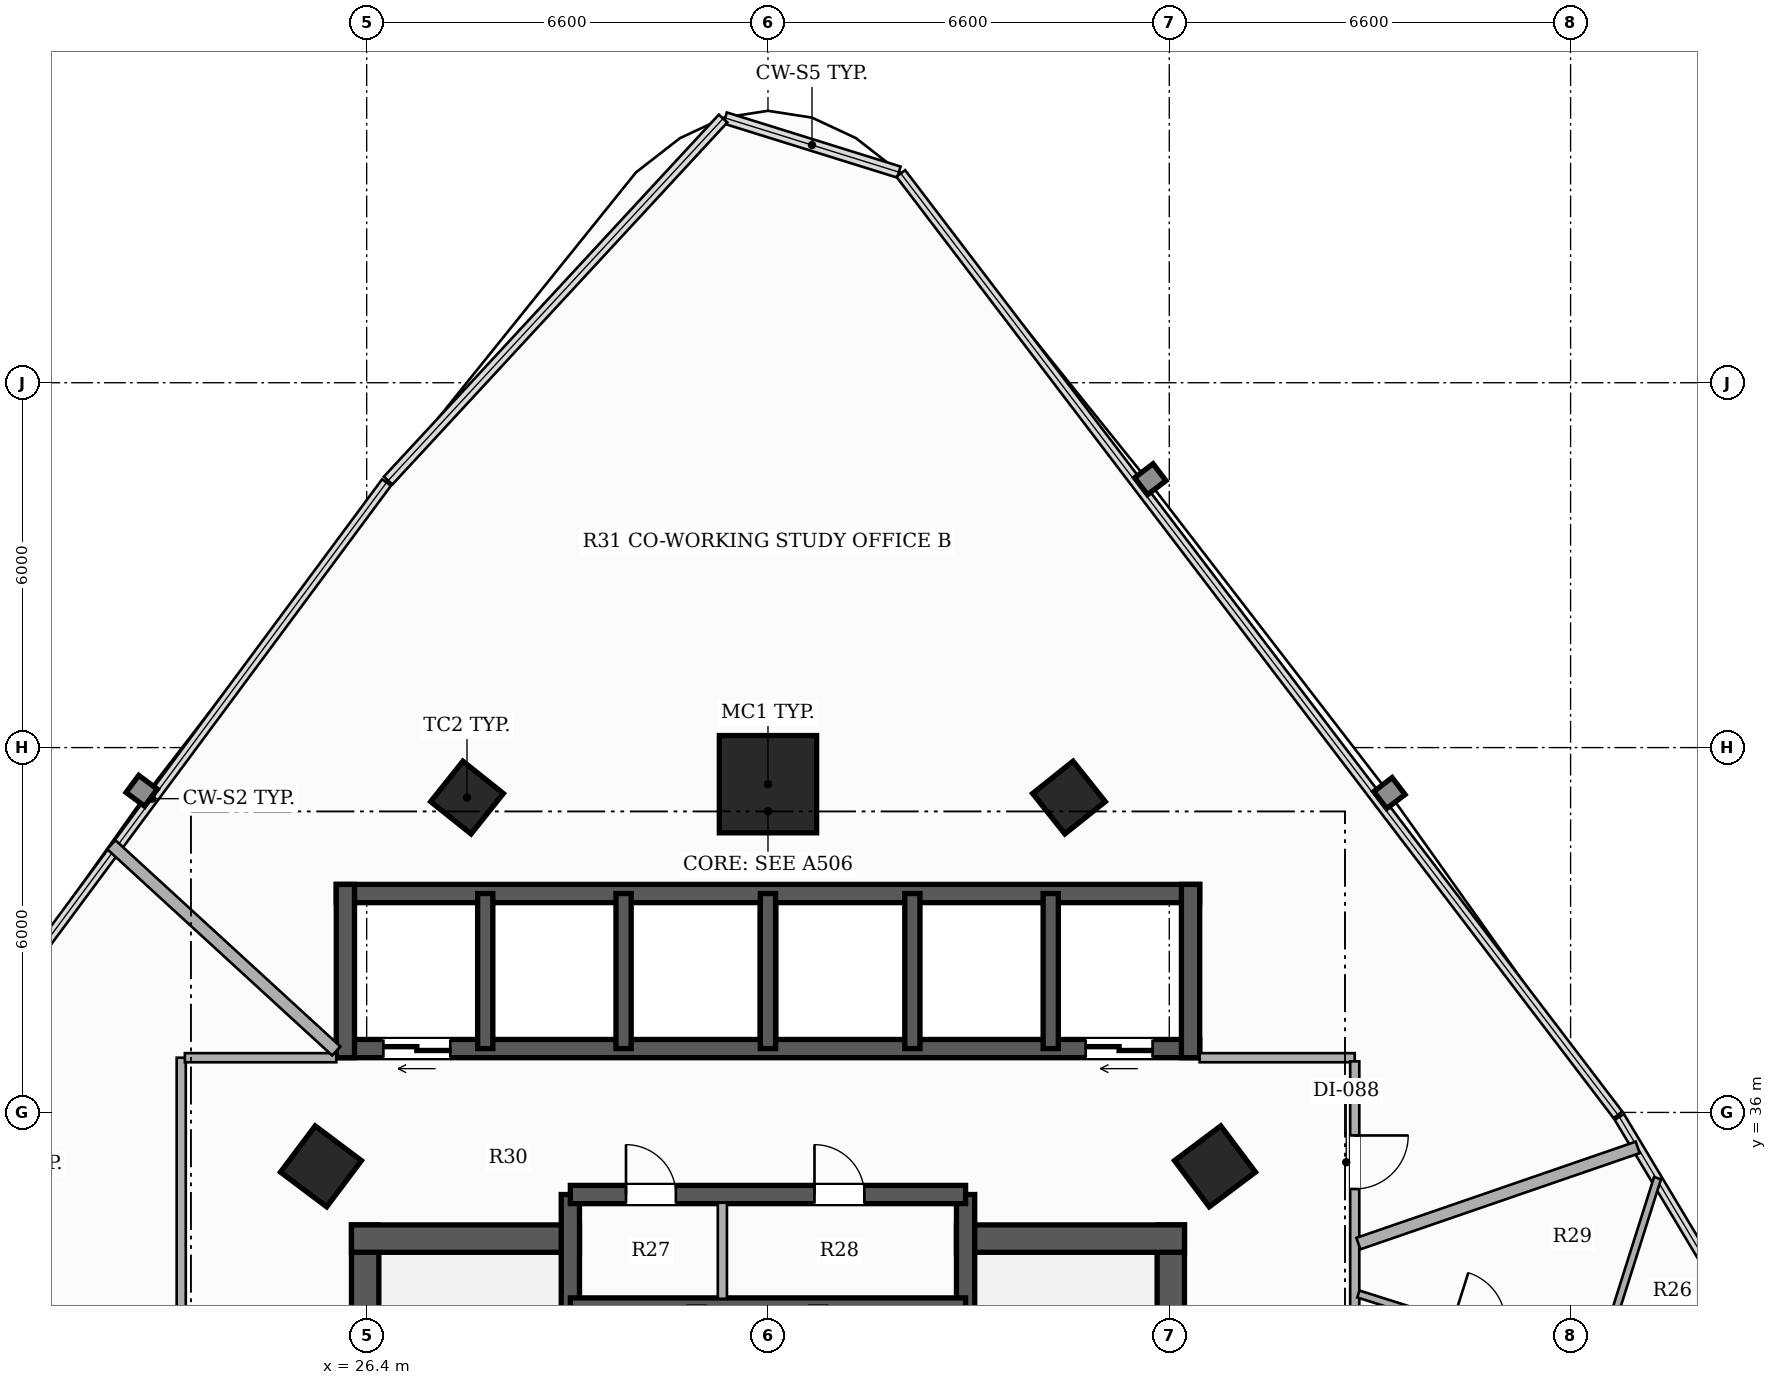
"""IFC4 building model, lengths in metres.
Left out: names, types, materials, properties, quantities, classifications, styles, units other than length and angle.
Written with IfcOpenShell. Run it as: python <this file> out.ifc"""

import sys

from ifc_helpers import new_model, si_unit, direction, frame, frame_2d, origin, origin_2d, place, context, subcontext, project, spatial, rectangle, hollow_rectangle, extrude, element, fill, save


model = new_model("IFC4")
c1 = context("Model", 3, precision=1e-05, world=origin(), true_north=direction((0.0, 1.0)))
c2 = subcontext(c1, "Body", "Model", "MODEL_VIEW")
j1 = project(units=[si_unit("LENGTHUNIT", "METRE"), si_unit("PLANEANGLEUNIT", "RADIAN")], contexts=[c1])
p1 = place(None, origin())
s1 = spatial("IfcSite", under=j1, at=p1, CompositionType="ELEMENT")
p2 = place(p1, origin())
s2 = spatial("IfcBuilding", under=s1, at=p2, CompositionType="ELEMENT")
p3 = place(p2, frame((0.0, 0.0, 33.5)))
s3 = spatial("IfcBuildingStorey", under=s2, at=p3, CompositionType="ELEMENT", Elevation=33.5)
p4 = place(p3, frame((26.375, 26.45, 0.0), z_axis=(0.0, 0.0, 1.0), x_axis=(0.0, 1.0, 0.0)))
e1 = element("IfcWall", 1, at=p4, inside=s3, PredefinedType="SHEAR", context=c2, shape_type="SweptSolid", body=[
    extrude(rectangle(XDim=7.7, YDim=0.45, at=frame_2d((3.85, 0.0))), origin(), (0.0, 0.0, 1.0), 3.3),
])
p5 = place(p3, frame((26.15, 33.925, 0.0), z_axis=(0.0, 0.0, 1.0), x_axis=(1.0, 0.0, 0.0)))
e2 = element("IfcWall", 2, at=p5, inside=s3, PredefinedType="SHEAR", context=c2, shape_type="SweptSolid", body=[
    extrude(rectangle(XDim=3.75, YDim=0.45, at=frame_2d((1.875, 0.0))), origin(), (0.0, 0.0, 1.0), 3.3),
])
p6 = place(p3, frame((39.625, 26.45, 0.0), z_axis=(0.0, 0.0, 1.0), x_axis=(0.0, 1.0, 0.0)))
e3 = element("IfcWall", 3, at=p6, inside=s3, PredefinedType="SHEAR", context=c2, shape_type="SweptSolid", body=[
    extrude(rectangle(XDim=7.7, YDim=0.45, at=frame_2d((3.85, 0.0))), origin(), (0.0, 0.0, 1.0), 3.3),
])
p7 = place(p3, frame((36.1, 33.925, 0.0), z_axis=(0.0, 0.0, 1.0), x_axis=(1.0, 0.0, 0.0)))
e4 = element("IfcWall", 4, at=p7, inside=s3, PredefinedType="SHEAR", context=c2, shape_type="SweptSolid", body=[
    extrude(rectangle(XDim=3.75, YDim=0.45, at=frame_2d((1.875, 0.0))), origin(), (0.0, 0.0, 1.0), 3.3),
])
p8 = place(p3, frame((29.75, 26.45, 0.0), z_axis=(0.0, 0.0, 1.0), x_axis=(0.0, 1.0, 0.0)))
e5 = element("IfcWall", 5, at=p8, inside=s3, PredefinedType="SHEAR", context=c2, shape_type="SweptSolid", body=[
    extrude(rectangle(XDim=8.2, YDim=0.3, at=frame_2d((4.1, 0.0))), origin(), (0.0, 0.0, 1.0), 3.3),
])
p9 = place(p8, frame((0.6, 0.0, 0.0)))
e6 = element("IfcOpeningElement", 6, at=p9, cuts=e5, PredefinedType="OPENING", context=c2, shape_type="SweptSolid", body=[
    extrude(rectangle(XDim=1.05, YDim=2.15, at=frame_2d((0.525, 1.075))), frame((0.0, 0.16, 0.0), z_axis=(0.0, -1.0, 0.0), x_axis=(1.0, 0.0, 0.0)), (0.0, 0.0, 1.0), 0.32),
])
p10 = place(p3, frame((36.25, 26.45, 0.0), z_axis=(0.0, 0.0, 1.0), x_axis=(0.0, 1.0, 0.0)))
e7 = element("IfcWall", 7, at=p10, inside=s3, PredefinedType="SHEAR", context=c2, shape_type="SweptSolid", body=[
    extrude(rectangle(XDim=8.2, YDim=0.3, at=frame_2d((4.1, 0.0))), origin(), (0.0, 0.0, 1.0), 3.3),
])
p11 = place(p10, frame((0.6, 0.0, 0.0)))
e8 = element("IfcOpeningElement", 8, at=p11, cuts=e7, PredefinedType="OPENING", context=c2, shape_type="SweptSolid", body=[
    extrude(rectangle(XDim=1.05, YDim=2.15, at=frame_2d((0.525, 1.075))), frame((0.0, 0.16, 0.0), z_axis=(0.0, -1.0, 0.0), x_axis=(1.0, 0.0, 0.0)), (0.0, 0.0, 1.0), 0.32),
])
p12 = place(p3, frame((29.75, 32.8, 0.0), z_axis=(0.0, 0.0, 1.0), x_axis=(1.0, 0.0, 0.0)))
e9 = element("IfcWall", 9, at=p12, inside=s3, PredefinedType="SHEAR", context=c2, shape_type="SweptSolid", body=[
    extrude(rectangle(XDim=6.5, YDim=0.3, at=frame_2d((3.25, 0.0))), origin(), (0.0, 0.0, 1.0), 3.3),
])
p13 = place(p3, frame((29.75, 34.65, 0.0), z_axis=(0.0, 0.0, 1.0), x_axis=(1.0, 0.0, 0.0)))
e10 = element("IfcWall", 10, at=p13, inside=s3, PredefinedType="SHEAR", context=c2, shape_type="SweptSolid", body=[
    extrude(rectangle(XDim=6.5, YDim=0.3, at=frame_2d((3.25, 0.0))), origin(), (0.0, 0.0, 1.0), 3.3),
])
p14 = place(p13, frame((0.915, 0.0, 0.0)))
e11 = element("IfcOpeningElement", 11, at=p14, cuts=e10, PredefinedType="OPENING", context=c2, shape_type="SweptSolid", body=[
    extrude(rectangle(XDim=0.82, YDim=2.1, at=frame_2d((0.41, 1.05))), frame((0.0, 0.16, 0.0), z_axis=(0.0, -1.0, 0.0), x_axis=(1.0, 0.0, 0.0)), (0.0, 0.0, 1.0), 0.32),
])
p15 = place(p13, frame((4.015, 0.0, 0.0)))
e12 = element("IfcOpeningElement", 12, at=p15, cuts=e10, PredefinedType="OPENING", context=c2, shape_type="SweptSolid", body=[
    extrude(rectangle(XDim=0.82, YDim=2.1, at=frame_2d((0.41, 1.05))), frame((0.0, 0.16, 0.0), z_axis=(0.0, -1.0, 0.0), x_axis=(1.0, 0.0, 0.0)), (0.0, 0.0, 1.0), 0.32),
])
p16 = place(p3, frame((40.1, 37.05, 0.0), z_axis=(0.0, 0.0, 1.0), x_axis=(-1.0, 0.0, 0.0)))
e13 = element("IfcWall", 13, at=p16, inside=s3, PredefinedType="SHEAR", context=c2, shape_type="SweptSolid", body=[
    extrude(rectangle(XDim=14.2, YDim=0.3, at=frame_2d((7.1, 0.0))), origin(), (0.0, 0.0, 1.0), 3.3),
])
p17 = place(p16, frame((12.325, 0.0, 0.0)))
e14 = element("IfcOpeningElement", 14, at=p17, cuts=e13, PredefinedType="OPENING", context=c2, shape_type="SweptSolid", body=[
    extrude(rectangle(XDim=1.1, YDim=2.2, at=frame_2d((0.55, 1.1))), frame((0.0, 0.16, 0.0), z_axis=(0.0, -1.0, 0.0), x_axis=(1.0, 0.0, 0.0)), (0.0, 0.0, 1.0), 0.32),
])
p18 = place(p16, frame((0.775, 0.0, 0.0)))
e15 = element("IfcOpeningElement", 15, at=p18, cuts=e13, PredefinedType="OPENING", context=c2, shape_type="SweptSolid", body=[
    extrude(rectangle(XDim=1.1, YDim=2.2, at=frame_2d((0.55, 1.1))), frame((0.0, 0.16, 0.0), z_axis=(0.0, -1.0, 0.0), x_axis=(1.0, 0.0, 0.0)), (0.0, 0.0, 1.0), 0.32),
])
p19 = place(p3, frame((25.9, 39.6, 0.0), z_axis=(0.0, 0.0, 1.0), x_axis=(1.0, 0.0, 0.0)))
e16 = element("IfcWall", 16, at=p19, inside=s3, PredefinedType="SHEAR", context=c2, shape_type="SweptSolid", body=[
    extrude(rectangle(XDim=14.2, YDim=0.3, at=frame_2d((7.1, 0.0))), origin(), (0.0, 0.0, 1.0), 3.3),
])
for number, where, z_axis, x_axis in (
    (17, (26.05, 36.9, 0.0), (0.0, 0.0, 1.0), (0.0, 1.0, 0.0)),
    (18, (39.95, 36.9, 0.0), (0.0, 0.0, 1.0), (0.0, 1.0, 0.0)),
):
    element("IfcWall", number, at=place(p3, frame(where, z_axis=z_axis, x_axis=x_axis)), inside=s3, PredefinedType="SHEAR", context=c2, shape_type="SweptSolid", body=[
        extrude(rectangle(XDim=2.85, YDim=0.3, at=frame_2d((1.425, 0.0))), origin(), (0.0, 0.0, 1.0), 3.3),
    ])
for number, where, z_axis, x_axis in (
    (19, (28.35, 37.05, 0.0), (0.0, 0.0, 1.0), (0.0, 1.0, 0.0)),
    (20, (30.625, 37.05, 0.0), (0.0, 0.0, 1.0), (0.0, 1.0, 0.0)),
    (21, (33.0, 37.05, 0.0), (0.0, 0.0, 1.0), (0.0, 1.0, 0.0)),
    (22, (35.375, 37.05, 0.0), (0.0, 0.0, 1.0), (0.0, 1.0, 0.0)),
    (23, (37.65, 37.05, 0.0), (0.0, 0.0, 1.0), (0.0, 1.0, 0.0)),
):
    element("IfcWall", number, at=place(p3, frame(where, z_axis=z_axis, x_axis=x_axis)), inside=s3, PredefinedType="SHEAR", context=c2, shape_type="SweptSolid", body=[
        extrude(rectangle(XDim=2.55, YDim=0.25, at=frame_2d((1.275, 0.0))), origin(), (0.0, 0.0, 1.0), 3.3),
    ])
p20 = place(p3, frame((33.0, 41.398, 0.0), z_axis=(0.0, 0.0, 1.0), x_axis=(1.0, 0.0, 0.0)))
e24 = element("IfcColumn", 24, at=p20, inside=s3, PredefinedType="COLUMN", context=c2, shape_type="SweptSolid", body=[
    extrude(hollow_rectangle(XDim=1.6, YDim=1.6, WallThickness=0.05, at=origin_2d()), origin(), (0.0, 0.0, 1.0), 3.3),
])
for number, where, z_axis, x_axis in (
    (25, (25.648, 35.113, 0.0), (0.0, 0.0, 1.0), (0.6, 0.8, 0.0)),
    (26, (40.352, 35.113, 0.0), (0.0, 0.0, 1.0), (-0.6, 0.8, 0.0)),
):
    element("IfcColumn", number, at=place(p3, frame(where, z_axis=z_axis, x_axis=x_axis)), inside=s3, PredefinedType="COLUMN", context=c2, shape_type="SweptSolid", body=[
        extrude(hollow_rectangle(XDim=0.95, YDim=0.95, WallThickness=0.032, at=origin_2d()), origin(), (0.0, 0.0, 1.0), 3.3),
    ])
for number, where, z_axis, x_axis in (
    (27, (28.05, 41.178, 0.0), (0.0, 0.0, 1.0), (0.624, 0.782, 0.0)),
    (28, (37.95, 41.178, 0.0), (0.0, 0.0, 1.0), (-0.624, 0.782, 0.0)),
):
    element("IfcColumn", number, at=place(p3, frame(where, z_axis=z_axis, x_axis=x_axis)), inside=s3, PredefinedType="COLUMN", context=c2, shape_type="SweptSolid", body=[
        extrude(hollow_rectangle(XDim=0.85, YDim=0.85, WallThickness=0.028, at=origin_2d()), origin(), (0.0, 0.0, 1.0), 3.3),
    ])
p21 = place(p3, frame((32.25, 32.935, 0.0), z_axis=(0.0, 0.0, 1.0), x_axis=(0.0, 1.0, 0.0)))
e29 = element("IfcWall", 29, at=p21, inside=s3, PredefinedType="PARTITIONING", context=c2, shape_type="SweptSolid", body=[
    extrude(rectangle(XDim=1.58, YDim=0.15, at=frame_2d((0.79, 0.0))), origin(), (0.0, 0.0, 1.0), 3.06),
])
p22 = place(p3, frame((40.1, 36.9, 0.0), z_axis=(0.0, 0.0, 1.0), x_axis=(1.0, 0.0, 0.0)))
e30 = element("IfcWall", 30, at=p22, inside=s3, PredefinedType="PARTITIONING", context=c2, shape_type="SweptSolid", body=[
    extrude(rectangle(XDim=2.55, YDim=0.15, at=frame_2d((1.275, 0.0))), origin(), (0.0, 0.0, 1.0), 2.413),
])
p23 = place(p3, frame((42.65, 36.84, 0.0), z_axis=(0.0, 0.0, 1.0), x_axis=(0.0, -1.0, 0.0)))
e31 = element("IfcWall", 31, at=p23, inside=s3, PredefinedType="PARTITIONING", context=c2, shape_type="SweptSolid", body=[
    extrude(rectangle(XDim=25.04, YDim=0.15, at=frame_2d((12.52, 0.0))), origin(), (0.0, 0.0, 1.0), 2.413),
])
p24 = place(p23, frame((1.219, 0.0, 0.0)))
e32 = element("IfcOpeningElement", 32, at=p24, cuts=e31, PredefinedType="OPENING", context=c2, shape_type="SweptSolid", body=[
    extrude(rectangle(XDim=0.88, YDim=2.1, at=frame_2d((0.44, 1.05))), frame((0.0, 0.085, 0.0), z_axis=(0.0, -1.0, 0.0), x_axis=(1.0, 0.0, 0.0)), (0.0, 0.0, 1.0), 0.17),
])
p25 = place(p23, frame((21.047, 0.0, 0.0)))
e33 = element("IfcOpeningElement", 33, at=p25, cuts=e31, PredefinedType="OPENING", context=c2, shape_type="SweptSolid", body=[
    extrude(rectangle(XDim=0.88, YDim=2.1, at=frame_2d((0.44, 1.05))), frame((0.0, 0.085, 0.0), z_axis=(0.0, -1.0, 0.0), x_axis=(1.0, 0.0, 0.0)), (0.0, 0.0, 1.0), 0.17),
])
p26 = place(p23, frame((16.029, 0.0, 0.0)))
e34 = element("IfcOpeningElement", 34, at=p26, cuts=e31, PredefinedType="OPENING", context=c2, shape_type="SweptSolid", body=[
    extrude(rectangle(XDim=0.92, YDim=2.15, at=frame_2d((0.46, 1.075))), frame((0.0, 0.085, 0.0), z_axis=(0.0, -1.0, 0.0), x_axis=(1.0, 0.0, 0.0)), (0.0, 0.0, 1.0), 0.17),
])
p27 = place(p23, frame((12.486, 0.0, 0.0)))
e35 = element("IfcOpeningElement", 35, at=p27, cuts=e31, PredefinedType="OPENING", context=c2, shape_type="SweptSolid", body=[
    extrude(rectangle(XDim=0.88, YDim=2.1, at=frame_2d((0.44, 1.05))), frame((0.0, 0.085, 0.0), z_axis=(0.0, -1.0, 0.0), x_axis=(1.0, 0.0, 0.0)), (0.0, 0.0, 1.0), 0.17),
])
p28 = place(p23, frame((6.638, 0.0, 0.0)))
e36 = element("IfcOpeningElement", 36, at=p28, cuts=e31, PredefinedType="OPENING", context=c2, shape_type="SweptSolid", body=[
    extrude(rectangle(XDim=0.92, YDim=2.15, at=frame_2d((0.46, 1.075))), frame((0.0, 0.085, 0.0), z_axis=(0.0, -1.0, 0.0), x_axis=(1.0, 0.0, 0.0)), (0.0, 0.0, 1.0), 0.17),
])
p29 = place(p3, frame((23.35, 11.86, 0.0), z_axis=(0.0, 0.0, 1.0), x_axis=(0.0, 1.0, 0.0)))
e37 = element("IfcWall", 37, at=p29, inside=s3, PredefinedType="PARTITIONING", context=c2, shape_type="SweptSolid", body=[
    extrude(rectangle(XDim=25.04, YDim=0.15, at=frame_2d((12.52, 0.0))), origin(), (0.0, 0.0, 1.0), 2.413),
])
p30 = place(p29, frame((9.29, 0.0, 0.0)))
e38 = element("IfcOpeningElement", 38, at=p30, cuts=e37, PredefinedType="OPENING", context=c2, shape_type="SweptSolid", body=[
    extrude(rectangle(XDim=0.92, YDim=2.15, at=frame_2d((0.46, 1.075))), frame((0.0, 0.085, 0.0), z_axis=(0.0, -1.0, 0.0), x_axis=(1.0, 0.0, 0.0)), (0.0, 0.0, 1.0), 0.17),
])
p31 = place(p29, frame((18.865, 0.0, 0.0)))
e39 = element("IfcOpeningElement", 39, at=p31, cuts=e37, PredefinedType="OPENING", context=c2, shape_type="SweptSolid", body=[
    extrude(rectangle(XDim=0.88, YDim=2.1, at=frame_2d((0.44, 1.05))), frame((0.0, 0.085, 0.0), z_axis=(0.0, -1.0, 0.0), x_axis=(1.0, 0.0, 0.0)), (0.0, 0.0, 1.0), 0.17),
])
p32 = place(p29, frame((2.566, 0.0, 0.0)))
e40 = element("IfcOpeningElement", 40, at=p32, cuts=e37, PredefinedType="OPENING", context=c2, shape_type="SweptSolid", body=[
    extrude(rectangle(XDim=0.92, YDim=2.15, at=frame_2d((0.46, 1.075))), frame((0.0, 0.085, 0.0), z_axis=(0.0, -1.0, 0.0), x_axis=(1.0, 0.0, 0.0)), (0.0, 0.0, 1.0), 0.17),
])
p33 = place(p3, frame((23.41, 36.9, 0.0), z_axis=(0.0, 0.0, 1.0), x_axis=(1.0, 0.0, 0.0)))
e41 = element("IfcWall", 41, at=p33, inside=s3, PredefinedType="PARTITIONING", context=c2, shape_type="SweptSolid", body=[
    extrude(rectangle(XDim=2.49, YDim=0.15, at=frame_2d((1.245, 0.0))), origin(), (0.0, 0.0, 1.0), 2.413),
])
p34 = place(p3, frame((25.9, 37.01, 0.0), z_axis=(0.0, 0.0, 1.0), x_axis=(-0.737010798249, 0.675880968266, 0.0)))
e42 = element("IfcWall", 42, at=p34, inside=s3, PredefinedType="PARTITIONING", context=c2, shape_type="SweptSolid", body=[
    extrude(rectangle(XDim=5.02, YDim=0.2, at=frame_2d((2.51, 0.0))), origin(), (0.0, 0.0, 1.0), 3.06),
])
p35 = place(p3, frame((47.304, 35.425, 0.0), z_axis=(0.0, 0.0, 1.0), x_axis=(-0.945506397197, -0.325603520956, 0.0)))
e43 = element("IfcWall", 43, at=p35, inside=s3, PredefinedType="PARTITIONING", context=c2, shape_type="SweptSolid", body=[
    extrude(rectangle(XDim=4.859, YDim=0.2, at=frame_2d((2.429, 0.0))), origin(), (0.0, 0.0, 1.0), 3.06),
])
p36 = place(p3, frame((42.71, 33.014, 0.0), z_axis=(0.0, 0.0, 1.0), x_axis=(0.953299814988, -0.302025599484, 0.0)))
e44 = element("IfcWall", 44, at=p36, inside=s3, PredefinedType="PARTITIONING", context=c2, shape_type="SweptSolid", body=[
    extrude(rectangle(XDim=4.115, YDim=0.12, at=frame_2d((2.058, 0.0))), origin(), (0.0, 0.0, 1.0), 3.06),
])
p37 = place(p36, frame((1.618, 0.0, 0.0)))
e45 = element("IfcOpeningElement", 45, at=p37, cuts=e44, PredefinedType="OPENING", context=c2, shape_type="SweptSolid", body=[
    extrude(rectangle(XDim=0.88, YDim=2.1, at=frame_2d((0.44, 1.05))), frame((0.0, 0.07, 0.0), z_axis=(0.0, -1.0, 0.0), x_axis=(1.0, 0.0, 0.0)), (0.0, 0.0, 1.0), 0.14),
])
p38 = place(p3, frame((46.633, 31.771, 0.0), z_axis=(0.0, 0.0, 1.0), x_axis=(0.301799891186, 0.953371294764, 0.0)))
e46 = element("IfcWall", 46, at=p38, inside=s3, PredefinedType="PARTITIONING", context=c2, shape_type="SweptSolid", body=[
    extrude(rectangle(XDim=3.303, YDim=0.12, at=frame_2d((1.651, 0.0))), origin(), (0.0, 0.0, 1.0), 3.06),
])
p39 = place(p17, origin())
e47 = element("IfcDoor", 47, at=p39, inside=s3, OperationType="DOUBLE_DOOR_SLIDING", PredefinedType="DOOR", context=c2, shape_type="SweptSolid", body=[
    extrude(rectangle(XDim=1.1, YDim=2.2, at=frame_2d((0.55, 1.1))), frame((0.0, 0.025, 0.0), z_axis=(0.0, -1.0, 0.0), x_axis=(1.0, 0.0, 0.0)), (0.0, 0.0, 1.0), 0.05),
])
fill(e14, e47)
p40 = place(p18, origin())
e48 = element("IfcDoor", 48, at=p40, inside=s3, OperationType="DOUBLE_DOOR_SLIDING", PredefinedType="DOOR", context=c2, shape_type="SweptSolid", body=[
    extrude(rectangle(XDim=1.1, YDim=2.2, at=frame_2d((0.55, 1.1))), frame((0.0, 0.025, 0.0), z_axis=(0.0, -1.0, 0.0), x_axis=(1.0, 0.0, 0.0)), (0.0, 0.0, 1.0), 0.05),
])
fill(e15, e48)
p41 = place(p14, origin())
e49 = element("IfcDoor", 49, at=p41, inside=s3, OperationType="SINGLE_SWING_LEFT", PredefinedType="DOOR", context=c2, shape_type="SweptSolid", body=[
    extrude(rectangle(XDim=0.82, YDim=2.1, at=frame_2d((0.41, 1.05))), frame((0.0, 0.025, 0.0), z_axis=(0.0, -1.0, 0.0), x_axis=(1.0, 0.0, 0.0)), (0.0, 0.0, 1.0), 0.05),
])
fill(e11, e49)
p42 = place(p15, origin())
e50 = element("IfcDoor", 50, at=p42, inside=s3, OperationType="SINGLE_SWING_LEFT", PredefinedType="DOOR", context=c2, shape_type="SweptSolid", body=[
    extrude(rectangle(XDim=0.82, YDim=2.1, at=frame_2d((0.41, 1.05))), frame((0.0, 0.025, 0.0), z_axis=(0.0, -1.0, 0.0), x_axis=(1.0, 0.0, 0.0)), (0.0, 0.0, 1.0), 0.05),
])
fill(e12, e50)
p43 = place(p24, origin())
e51 = element("IfcDoor", 51, at=p43, inside=s3, OperationType="SINGLE_SWING_LEFT", PredefinedType="DOOR", context=c2, shape_type="SweptSolid", body=[
    extrude(rectangle(XDim=0.88, YDim=2.1, at=frame_2d((0.44, 1.05))), frame((0.0, 0.025, 0.0), z_axis=(0.0, -1.0, 0.0), x_axis=(1.0, 0.0, 0.0)), (0.0, 0.0, 1.0), 0.05),
])
fill(e32, e51)
save(model, sys.argv[1])
